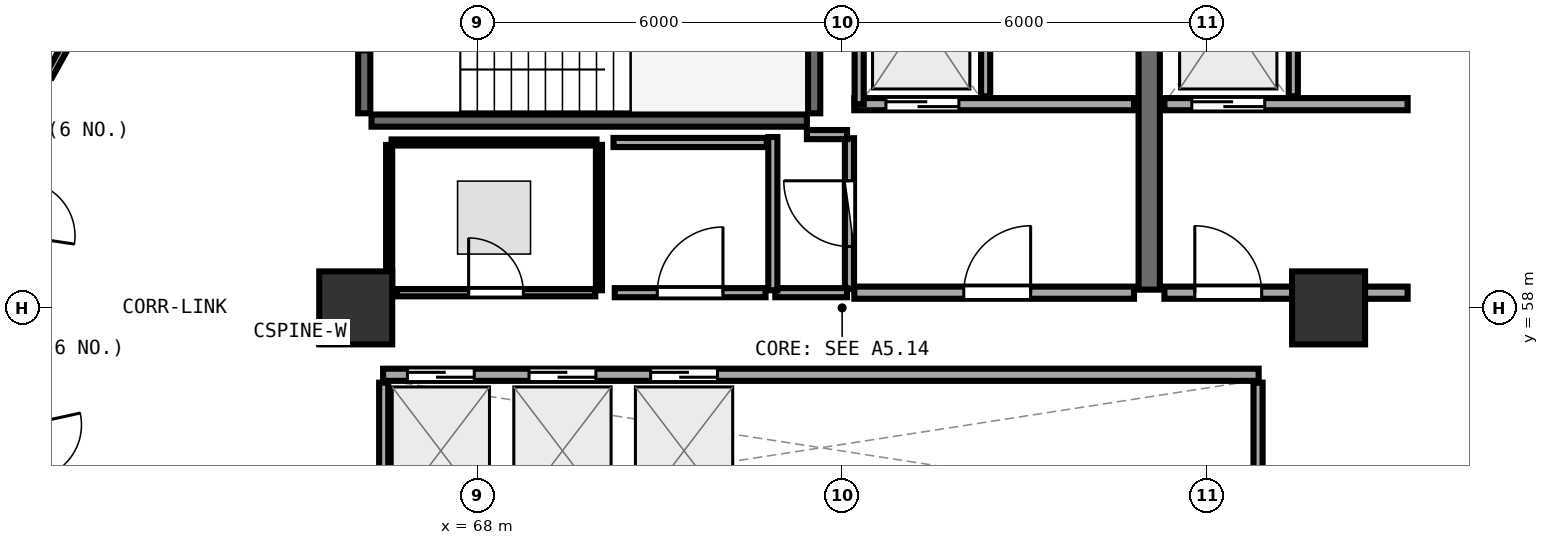
"""IFC4 building model, lengths in metres.
Left out: names, types, materials, properties, quantities, classifications, styles, units other than length and angle.
Written with IfcOpenShell. Run it as: python <this file> out.ifc"""

import sys

from ifc_helpers import new_model, si_unit, direction, frame, frame_2d, origin, origin_2d, place, context, subcontext, project, spatial, rectangle, extrude, element, fill, save


model = new_model("IFC4")
c1 = context("Model", 3, precision=1e-05, world=origin(), true_north=direction((0.0, 1.0)))
c2 = subcontext(c1, "Body", "Model", "MODEL_VIEW")
j1 = project(units=[si_unit("LENGTHUNIT", "METRE"), si_unit("PLANEANGLEUNIT", "RADIAN")], contexts=[c1])
p1 = place(None, origin())
s1 = spatial("IfcSite", under=j1, at=p1, CompositionType="ELEMENT")
p2 = place(p1, origin())
s2 = spatial("IfcBuilding", under=s1, at=p2, CompositionType="ELEMENT")
p3 = place(p2, frame((0.0, 0.0, 211.95)))
s3 = spatial("IfcBuildingStorey", under=s2, at=p3, CompositionType="ELEMENT", Elevation=211.95)
for number, where, z_axis, x_axis in (
    (1, (82.0, 58.0, 0.0), (0.0, 0.0, 1.0), (1.0, 0.0, 0.0)),
    (2, (66.0, 58.0, 0.0), (0.0, 0.0, 1.0), (1.0, 0.0, 0.0)),
):
    element("IfcColumn", number, at=place(p3, frame(where, z_axis=z_axis, x_axis=x_axis)), inside=s3, PredefinedType="PILASTER", context=c2, shape_type="SweptSolid", body=[
        extrude(rectangle(XDim=1.2, YDim=1.2, at=origin_2d()), origin(), (0.0, 0.0, 1.0), 3.75),
    ])
p4 = place(p3, frame((66.26, 61.08, 0.0), z_axis=(0.0, 0.0, 1.0), x_axis=(1.0, 0.0, 0.0)))
e3 = element("IfcWall", 3, at=p4, inside=s3, PredefinedType="SHEAR", context=c2, shape_type="SweptSolid", body=[
    extrude(rectangle(XDim=7.16, YDim=0.2, at=frame_2d((3.58, 0.0))), origin(), (0.0, 0.0, 1.0), 3.49),
])
p5 = place(p3, frame((73.54, 61.2, 0.0), z_axis=(0.0, 0.0, 1.0), x_axis=(0.0, 1.0, 0.0)))
e4 = element("IfcWall", 4, at=p5, inside=s3, PredefinedType="SHEAR", context=c2, shape_type="SweptSolid", body=[
    extrude(rectangle(XDim=3.07, YDim=0.2, at=frame_2d((1.535, 0.0))), origin(), (0.0, 0.0, 1.0), 3.49),
])
p6 = place(p3, frame((66.14, 64.27, 0.0), z_axis=(0.0, 0.0, 1.0), x_axis=(0.0, -1.0, 0.0)))
e5 = element("IfcWall", 5, at=p6, inside=s3, PredefinedType="SHEAR", context=c2, shape_type="SweptSolid", body=[
    extrude(rectangle(XDim=3.07, YDim=0.2, at=frame_2d((1.535, 0.0))), origin(), (0.0, 0.0, 1.0), 3.49),
])
p7 = place(p6, frame((1.01, 0.0, 0.0)))
e6 = element("IfcOpeningElement", 6, at=p7, cuts=e5, PredefinedType="OPENING", context=c2, shape_type="SweptSolid", body=[
    extrude(rectangle(XDim=1.05, YDim=2.1, at=frame_2d((0.525, 1.05))), frame((0.0, 0.11, 0.0), z_axis=(0.0, -1.0, 0.0), x_axis=(1.0, 0.0, 0.0)), (0.0, 0.0, 1.0), 0.22),
])
p8 = place(p3, frame((79.05, 58.3, 0.0), z_axis=(0.0, 0.0, 1.0), x_axis=(0.0, 1.0, 0.0)))
e7 = element("IfcWall", 7, at=p8, inside=s3, PredefinedType="SHEAR", context=c2, shape_type="SweptSolid", body=[
    extrude(rectangle(XDim=6.3, YDim=0.35, at=frame_2d((3.15, 0.0))), origin(), (0.0, 0.0, 1.0), 3.49),
])
p9 = place(p3, frame((74.2, 61.35, 0.0), z_axis=(0.0, 0.0, 1.0), x_axis=(1.0, 0.0, 0.0)))
e8 = element("IfcWall", 8, at=p9, inside=s3, PredefinedType="SOLIDWALL", context=c2, shape_type="SweptSolid", body=[
    extrude(rectangle(XDim=4.6, YDim=0.2, at=frame_2d((2.3, 0.0))), origin(), (0.0, 0.0, 1.0), 3.48),
])
p10 = place(p9, frame((0.52, 0.0, 0.0)))
e9 = element("IfcOpeningElement", 9, at=p10, cuts=e8, PredefinedType="OPENING", context=c2, shape_type="SweptSolid", body=[
    extrude(rectangle(XDim=1.2, YDim=2.15, at=frame_2d((0.6, 1.075))), frame((0.0, 0.11, 0.0), z_axis=(0.0, -1.0, 0.0), x_axis=(1.0, 0.0, 0.0)), (0.0, 0.0, 1.0), 0.22),
])
p11 = place(p3, frame((74.28, 61.35, 0.0), z_axis=(0.0, 0.0, 1.0), x_axis=(0.0, 1.0, 0.0)))
e10 = element("IfcWall", 10, at=p11, inside=s3, PredefinedType="PARTITIONING", context=c2, shape_type="SweptSolid", body=[
    extrude(rectangle(XDim=2.97, YDim=0.15, at=frame_2d((1.485, 0.0))), origin(), (0.0, 0.0, 1.0), 3.48),
])
p12 = place(p3, frame((76.36, 61.48, 0.0), z_axis=(0.0, 0.0, 1.0), x_axis=(0.0, 1.0, 0.0)))
e11 = element("IfcWall", 11, at=p12, inside=s3, PredefinedType="PARTITIONING", context=c2, shape_type="SweptSolid", body=[
    extrude(rectangle(XDim=2.84, YDim=0.15, at=frame_2d((1.42, 0.0))), origin(), (0.0, 0.0, 1.0), 3.48),
])
p13 = place(p3, frame((79.3, 61.35, 0.0), z_axis=(0.0, 0.0, 1.0), x_axis=(1.0, 0.0, 0.0)))
e12 = element("IfcWall", 12, at=p13, inside=s3, PredefinedType="SOLIDWALL", context=c2, shape_type="SweptSolid", body=[
    extrude(rectangle(XDim=4.0, YDim=0.2, at=frame_2d((2.0, 0.0))), origin(), (0.0, 0.0, 1.0), 2.775),
])
p14 = place(p13, frame((0.45, 0.0, 0.0)))
e13 = element("IfcOpeningElement", 13, at=p14, cuts=e12, PredefinedType="OPENING", context=c2, shape_type="SweptSolid", body=[
    extrude(rectangle(XDim=1.2, YDim=2.15, at=frame_2d((0.6, 1.075))), frame((0.0, 0.11, 0.0), z_axis=(0.0, -1.0, 0.0), x_axis=(1.0, 0.0, 0.0)), (0.0, 0.0, 1.0), 0.22),
])
p15 = place(p3, frame((81.42, 61.48, 0.0), z_axis=(0.0, 0.0, 1.0), x_axis=(0.0, 1.0, 0.0)))
e14 = element("IfcWall", 14, at=p15, inside=s3, PredefinedType="PARTITIONING", context=c2, shape_type="SweptSolid", body=[
    extrude(rectangle(XDim=2.84, YDim=0.15, at=frame_2d((1.42, 0.0))), origin(), (0.0, 0.0, 1.0), 3.48),
])
p16 = place(p3, frame((74.2, 58.25, 0.0), z_axis=(0.0, 0.0, 1.0), x_axis=(1.0, 0.0, 0.0)))
e15 = element("IfcWall", 15, at=p16, inside=s3, PredefinedType="SOLIDWALL", context=c2, shape_type="SweptSolid", body=[
    extrude(rectangle(XDim=4.6, YDim=0.2, at=frame_2d((2.3, 0.0))), origin(), (0.0, 0.0, 1.0), 3.48),
])
p17 = place(p16, frame((1.8, 0.0, 0.0)))
e16 = element("IfcOpeningElement", 16, at=p17, cuts=e15, PredefinedType="OPENING", context=c2, shape_type="SweptSolid", body=[
    extrude(rectangle(XDim=1.1, YDim=2.1, at=frame_2d((0.55, 1.05))), frame((0.0, 0.11, 0.0), z_axis=(0.0, -1.0, 0.0), x_axis=(1.0, 0.0, 0.0)), (0.0, 0.0, 1.0), 0.22),
])
p18 = place(p3, frame((79.3, 58.25, 0.0), z_axis=(0.0, 0.0, 1.0), x_axis=(1.0, 0.0, 0.0)))
e17 = element("IfcWall", 17, at=p18, inside=s3, PredefinedType="SOLIDWALL", context=c2, shape_type="SweptSolid", body=[
    extrude(rectangle(XDim=4.0, YDim=0.2, at=frame_2d((2.0, 0.0))), origin(), (0.0, 0.0, 1.0), 2.775),
])
p19 = place(p18, frame((0.5, 0.0, 0.0)))
e18 = element("IfcOpeningElement", 18, at=p19, cuts=e17, PredefinedType="OPENING", context=c2, shape_type="SweptSolid", body=[
    extrude(rectangle(XDim=1.1, YDim=2.1, at=frame_2d((0.55, 1.05))), frame((0.0, 0.11, 0.0), z_axis=(0.0, -1.0, 0.0), x_axis=(1.0, 0.0, 0.0)), (0.0, 0.0, 1.0), 0.22),
])
p20 = place(p3, frame((66.45, 56.9, 0.0), z_axis=(0.0, 0.0, 1.0), x_axis=(1.0, 0.0, 0.0)))
e19 = element("IfcWall", 19, at=p20, inside=s3, PredefinedType="SOLIDWALL", context=c2, shape_type="SweptSolid", body=[
    extrude(rectangle(XDim=14.4, YDim=0.2, at=frame_2d((7.2, 0.0))), origin(), (0.0, 0.0, 1.0), 3.48),
])
p21 = place(p20, frame((0.4, 0.0, 0.0)))
e20 = element("IfcOpeningElement", 20, at=p21, cuts=e19, PredefinedType="OPENING", context=c2, shape_type="SweptSolid", body=[
    extrude(rectangle(XDim=1.1, YDim=2.1, at=frame_2d((0.55, 1.05))), frame((0.0, 0.11, 0.0), z_axis=(0.0, -1.0, 0.0), x_axis=(1.0, 0.0, 0.0)), (0.0, 0.0, 1.0), 0.22),
])
p22 = place(p20, frame((2.4, 0.0, 0.0)))
e21 = element("IfcOpeningElement", 21, at=p22, cuts=e19, PredefinedType="OPENING", context=c2, shape_type="SweptSolid", body=[
    extrude(rectangle(XDim=1.1, YDim=2.1, at=frame_2d((0.55, 1.05))), frame((0.0, 0.11, 0.0), z_axis=(0.0, -1.0, 0.0), x_axis=(1.0, 0.0, 0.0)), (0.0, 0.0, 1.0), 0.22),
])
p23 = place(p20, frame((4.4, 0.0, 0.0)))
e22 = element("IfcOpeningElement", 22, at=p23, cuts=e19, PredefinedType="OPENING", context=c2, shape_type="SweptSolid", body=[
    extrude(rectangle(XDim=1.1, YDim=2.1, at=frame_2d((0.55, 1.05))), frame((0.0, 0.11, 0.0), z_axis=(0.0, -1.0, 0.0), x_axis=(1.0, 0.0, 0.0)), (0.0, 0.0, 1.0), 0.22),
])
for number, where, z_axis, x_axis in (
    (23, (66.46, 54.48, 0.0), (0.0, 0.0, 1.0), (0.0, 1.0, 0.0)),
    (24, (80.84, 54.48, 0.0), (0.0, 0.0, 1.0), (0.0, 1.0, 0.0)),
):
    element("IfcWall", number, at=place(p3, frame(where, z_axis=z_axis, x_axis=x_axis)), inside=s3, PredefinedType="PARTITIONING", context=c2, shape_type="SweptSolid", body=[
        extrude(rectangle(XDim=2.29, YDim=0.15, at=frame_2d((1.145, 0.0))), origin(), (0.0, 0.0, 1.0), 3.48),
    ])
p24 = place(p3, frame((74.12, 58.31, 0.0), z_axis=(0.0, 0.0, 1.0), x_axis=(0.0, 1.0, 0.0)))
e25 = element("IfcWall", 25, at=p24, inside=s3, PredefinedType="PARTITIONING", context=c2, shape_type="SweptSolid", body=[
    extrude(rectangle(XDim=2.48, YDim=0.15, at=frame_2d((1.24, 0.0))), origin(), (0.0, 0.0, 1.0), 3.48),
])
p25 = place(p24, frame((0.7, 0.0, 0.0)))
e26 = element("IfcOpeningElement", 26, at=p25, cuts=e25, PredefinedType="OPENING", context=c2, shape_type="SweptSolid", body=[
    extrude(rectangle(XDim=1.08, YDim=2.1, at=frame_2d((0.54, 1.05))), frame((0.0, 0.085, 0.0), z_axis=(0.0, -1.0, 0.0), x_axis=(1.0, 0.0, 0.0)), (0.0, 0.0, 1.0), 0.17),
])
p26 = place(p3, frame((66.675, 58.25, 0.0), z_axis=(0.0, 0.0, 1.0), x_axis=(1.0, 0.0, 0.0)))
e27 = element("IfcWall", 27, at=p26, inside=s3, PredefinedType="PARTITIONING", context=c2, shape_type="SweptSolid", body=[
    extrude(rectangle(XDim=3.265, YDim=0.12, at=frame_2d((1.632, 0.0))), origin(), (0.0, 0.0, 1.0), 3.48),
])
p27 = place(p26, frame((1.182, 0.0, 0.0)))
e28 = element("IfcOpeningElement", 28, at=p27, cuts=e27, PredefinedType="OPENING", context=c2, shape_type="SweptSolid", body=[
    extrude(rectangle(XDim=0.9, YDim=2.08, at=frame_2d((0.45, 1.04))), frame((0.0, 0.07, 0.0), z_axis=(0.0, -1.0, 0.0), x_axis=(1.0, 0.0, 0.0)), (0.0, 0.0, 1.0), 0.14),
])
p28 = place(p3, frame((70.26, 58.25, 0.0), z_axis=(0.0, 0.0, 1.0), x_axis=(1.0, 0.0, 0.0)))
e29 = element("IfcWall", 29, at=p28, inside=s3, PredefinedType="PARTITIONING", context=c2, shape_type="SweptSolid", body=[
    extrude(rectangle(XDim=2.48, YDim=0.15, at=frame_2d((1.24, 0.0))), origin(), (0.0, 0.0, 1.0), 3.48),
])
p29 = place(p28, frame((0.7, 0.0, 0.0)))
e30 = element("IfcOpeningElement", 30, at=p29, cuts=e29, PredefinedType="OPENING", context=c2, shape_type="SweptSolid", body=[
    extrude(rectangle(XDim=1.08, YDim=2.1, at=frame_2d((0.54, 1.05))), frame((0.0, 0.085, 0.0), z_axis=(0.0, -1.0, 0.0), x_axis=(1.0, 0.0, 0.0)), (0.0, 0.0, 1.0), 0.17),
])
p30 = place(p3, frame((62.759, 65.064, 0.0), z_axis=(0.0, 0.0, 1.0), x_axis=(-0.485877595764, -0.874026865683, 0.0)))
e31 = element("IfcWall", 31, at=p30, inside=s3, PredefinedType="PARTITIONING", context=c2, shape_type="SweptSolid", body=[
    extrude(rectangle(XDim=3.71, YDim=0.12, at=frame_2d((1.855, 0.0))), origin(), (0.0, 0.0, 1.0), 3.025),
])
p31 = place(p30, frame((1.405, 0.0, 0.0)))
e32 = element("IfcOpeningElement", 32, at=p31, cuts=e31, PredefinedType="OPENING", context=c2, shape_type="SweptSolid", body=[
    extrude(rectangle(XDim=0.9, YDim=2.08, at=frame_2d((0.45, 1.04))), frame((0.0, 0.07, 0.0), z_axis=(0.0, -1.0, 0.0), x_axis=(1.0, 0.0, 0.0)), (0.0, 0.0, 1.0), 0.14),
])
p32 = place(p3, frame((60.296, 57.414, 0.0), z_axis=(0.0, 0.0, 1.0), x_axis=(0.214769597133, -0.976664742963, 0.0)))
e33 = element("IfcWall", 33, at=p32, inside=s3, PredefinedType="PARTITIONING", context=c2, shape_type="SweptSolid", body=[
    extrude(rectangle(XDim=3.638, YDim=0.12, at=frame_2d((1.819, 0.0))), origin(), (0.0, 0.0, 1.0), 3.48),
])
p33 = place(p32, frame((1.369, 0.0, 0.0)))
e34 = element("IfcOpeningElement", 34, at=p33, cuts=e33, PredefinedType="OPENING", context=c2, shape_type="SweptSolid", body=[
    extrude(rectangle(XDim=0.9, YDim=2.08, at=frame_2d((0.45, 1.04))), frame((0.0, 0.07, 0.0), z_axis=(0.0, -1.0, 0.0), x_axis=(1.0, 0.0, 0.0)), (0.0, 0.0, 1.0), 0.14),
])
p34 = place(p3, frame((72.9, 58.25, 0.0), z_axis=(0.0, 0.0, 1.0), x_axis=(1.0, 0.0, 0.0)))
e35 = element("IfcWall", 35, at=p34, inside=s3, PredefinedType="PARTITIONING", context=c2, shape_type="SweptSolid", body=[
    extrude(rectangle(XDim=1.18, YDim=0.15, at=frame_2d((0.59, 0.0))), origin(), (0.0, 0.0, 1.0), 3.48),
])
p35 = place(p3, frame((74.08, 60.85, 0.0), z_axis=(0.0, 0.0, 1.0), x_axis=(-1.0, 0.0, 0.0)))
e36 = element("IfcWall", 36, at=p35, inside=s3, PredefinedType="PARTITIONING", context=c2, shape_type="SweptSolid", body=[
    extrude(rectangle(XDim=0.66, YDim=0.15, at=frame_2d((0.33, 0.0))), origin(), (0.0, 0.0, 1.0), 3.48),
])
p36 = place(p3, frame((72.86, 60.81, 0.0), z_axis=(0.0, 0.0, 1.0), x_axis=(0.0, -1.0, 0.0)))
e37 = element("IfcWall", 37, at=p36, inside=s3, PredefinedType="PARTITIONING", context=c2, shape_type="SweptSolid", body=[
    extrude(rectangle(XDim=2.52, YDim=0.15, at=frame_2d((1.26, 0.0))), origin(), (0.0, 0.0, 1.0), 3.48),
])
p37 = place(p3, frame((70.0, 58.29, 0.0), z_axis=(0.0, 0.0, 1.0), x_axis=(0.0, 1.0, 0.0)))
e38 = element("IfcWall", 38, at=p37, inside=s3, PredefinedType="PARTITIONING", context=c2, shape_type="SweptSolid", body=[
    extrude(rectangle(XDim=2.39, YDim=0.1, at=frame_2d((1.195, 0.0))), origin(), (0.0, 0.0, 1.0), 3.48),
])
p38 = place(p3, frame((69.96, 60.72, 0.0), z_axis=(0.0, 0.0, 1.0), x_axis=(-1.0, 0.0, 0.0)))
e39 = element("IfcWall", 39, at=p38, inside=s3, PredefinedType="PARTITIONING", context=c2, shape_type="SweptSolid", body=[
    extrude(rectangle(XDim=3.37, YDim=0.1, at=frame_2d((1.685, 0.0))), origin(), (0.0, 0.0, 1.0), 3.48),
])
p39 = place(p3, frame((66.55, 60.68, 0.0), z_axis=(0.0, 0.0, 1.0), x_axis=(0.0, -1.0, 0.0)))
e40 = element("IfcWall", 40, at=p39, inside=s3, PredefinedType="PARTITIONING", context=c2, shape_type="SweptSolid", body=[
    extrude(rectangle(XDim=2.383, YDim=0.1, at=frame_2d((1.191, 0.0))), origin(), (0.0, 0.0, 1.0), 3.48),
])
p40 = place(p3, frame((72.76, 60.72, 0.0), z_axis=(0.0, 0.0, 1.0), x_axis=(-1.0, 0.0, 0.0)))
e41 = element("IfcWall", 41, at=p40, inside=s3, PredefinedType="PARTITIONING", context=c2, shape_type="SweptSolid", body=[
    extrude(rectangle(XDim=2.52, YDim=0.15, at=frame_2d((1.26, 0.0))), origin(), (0.0, 0.0, 1.0), 3.48),
])
p41 = place(p3, frame((87.468, 60.334, 0.0), z_axis=(0.0, 0.0, 1.0), x_axis=(-0.534944175276, 0.844887406308, 0.0)))
e42 = element("IfcWall", 42, at=p41, inside=s3, PredefinedType="PARTITIONING", context=c2, shape_type="SweptSolid", body=[
    extrude(rectangle(XDim=8.128, YDim=0.1, at=frame_2d((4.064, 0.0))), origin(), (0.0, 0.0, 1.0), 3.025),
])
p42 = place(p10, origin())
e43 = element("IfcDoor", 43, at=p42, inside=s3, OperationType="DOUBLE_DOOR_SLIDING", PredefinedType="DOOR", context=c2, shape_type="SweptSolid", body=[
    extrude(rectangle(XDim=1.2, YDim=2.15, at=frame_2d((0.6, 1.075))), frame((0.0, 0.025, 0.0), z_axis=(0.0, -1.0, 0.0), x_axis=(1.0, 0.0, 0.0)), (0.0, 0.0, 1.0), 0.05),
])
fill(e9, e43)
p43 = place(p14, origin())
e44 = element("IfcDoor", 44, at=p43, inside=s3, OperationType="DOUBLE_DOOR_SLIDING", PredefinedType="DOOR", context=c2, shape_type="SweptSolid", body=[
    extrude(rectangle(XDim=1.2, YDim=2.15, at=frame_2d((0.6, 1.075))), frame((0.0, 0.025, 0.0), z_axis=(0.0, -1.0, 0.0), x_axis=(1.0, 0.0, 0.0)), (0.0, 0.0, 1.0), 0.05),
])
fill(e13, e44)
p44 = place(p17, frame((1.1, 0.0, 0.0), z_axis=(0.0, 0.0, 1.0), x_axis=(-1.0, 0.0, 0.0)))
e45 = element("IfcDoor", 45, at=p44, inside=s3, OperationType="SINGLE_SWING_LEFT", PredefinedType="DOOR", context=c2, shape_type="SweptSolid", body=[
    extrude(rectangle(XDim=1.1, YDim=2.1, at=frame_2d((0.55, 1.05))), frame((0.0, 0.025, 0.0), z_axis=(0.0, -1.0, 0.0), x_axis=(1.0, 0.0, 0.0)), (0.0, 0.0, 1.0), 0.05),
])
fill(e16, e45)
p45 = place(p19, frame((1.1, 0.0, 0.0), z_axis=(0.0, 0.0, 1.0), x_axis=(-1.0, 0.0, 0.0)))
e46 = element("IfcDoor", 46, at=p45, inside=s3, OperationType="SINGLE_SWING_RIGHT", PredefinedType="DOOR", context=c2, shape_type="SweptSolid", body=[
    extrude(rectangle(XDim=1.1, YDim=2.1, at=frame_2d((0.55, 1.05))), frame((0.0, 0.025, 0.0), z_axis=(0.0, -1.0, 0.0), x_axis=(1.0, 0.0, 0.0)), (0.0, 0.0, 1.0), 0.05),
])
fill(e18, e46)
p46 = place(p21, origin())
e47 = element("IfcDoor", 47, at=p46, inside=s3, OperationType="DOUBLE_DOOR_SLIDING", PredefinedType="DOOR", context=c2, shape_type="SweptSolid", body=[
    extrude(rectangle(XDim=1.1, YDim=2.1, at=frame_2d((0.55, 1.05))), frame((0.0, 0.025, 0.0), z_axis=(0.0, -1.0, 0.0), x_axis=(1.0, 0.0, 0.0)), (0.0, 0.0, 1.0), 0.05),
])
fill(e20, e47)
p47 = place(p22, origin())
e48 = element("IfcDoor", 48, at=p47, inside=s3, OperationType="DOUBLE_DOOR_SLIDING", PredefinedType="DOOR", context=c2, shape_type="SweptSolid", body=[
    extrude(rectangle(XDim=1.1, YDim=2.1, at=frame_2d((0.55, 1.05))), frame((0.0, 0.025, 0.0), z_axis=(0.0, -1.0, 0.0), x_axis=(1.0, 0.0, 0.0)), (0.0, 0.0, 1.0), 0.05),
])
fill(e21, e48)
p48 = place(p23, origin())
e49 = element("IfcDoor", 49, at=p48, inside=s3, OperationType="DOUBLE_DOOR_SLIDING", PredefinedType="DOOR", context=c2, shape_type="SweptSolid", body=[
    extrude(rectangle(XDim=1.1, YDim=2.1, at=frame_2d((0.55, 1.05))), frame((0.0, 0.025, 0.0), z_axis=(0.0, -1.0, 0.0), x_axis=(1.0, 0.0, 0.0)), (0.0, 0.0, 1.0), 0.05),
])
fill(e22, e49)
p49 = place(p25, origin())
e50 = element("IfcDoor", 50, at=p49, inside=s3, OperationType="SINGLE_SWING_RIGHT", PredefinedType="DOOR", context=c2, shape_type="SweptSolid", body=[
    extrude(rectangle(XDim=1.08, YDim=2.1, at=frame_2d((0.54, 1.05))), frame((0.0, 0.025, 0.0), z_axis=(0.0, -1.0, 0.0), x_axis=(1.0, 0.0, 0.0)), (0.0, 0.0, 1.0), 0.05),
])
fill(e26, e50)
p50 = place(p27, origin())
e51 = element("IfcDoor", 51, at=p50, inside=s3, OperationType="SINGLE_SWING_LEFT", PredefinedType="DOOR", context=c2, shape_type="SweptSolid", body=[
    extrude(rectangle(XDim=0.9, YDim=2.08, at=frame_2d((0.45, 1.04))), frame((0.0, 0.025, 0.0), z_axis=(0.0, -1.0, 0.0), x_axis=(1.0, 0.0, 0.0)), (0.0, 0.0, 1.0), 0.05),
])
fill(e28, e51)
p51 = place(p29, origin())
e52 = element("IfcDoor", 52, at=p51, inside=s3, OperationType="SINGLE_SWING_RIGHT", PredefinedType="DOOR", context=c2, shape_type="SweptSolid", body=[
    extrude(rectangle(XDim=1.08, YDim=2.1, at=frame_2d((0.54, 1.05))), frame((0.0, 0.025, 0.0), z_axis=(0.0, -1.0, 0.0), x_axis=(1.0, 0.0, 0.0)), (0.0, 0.0, 1.0), 0.05),
])
fill(e30, e52)
save(model, sys.argv[1])
